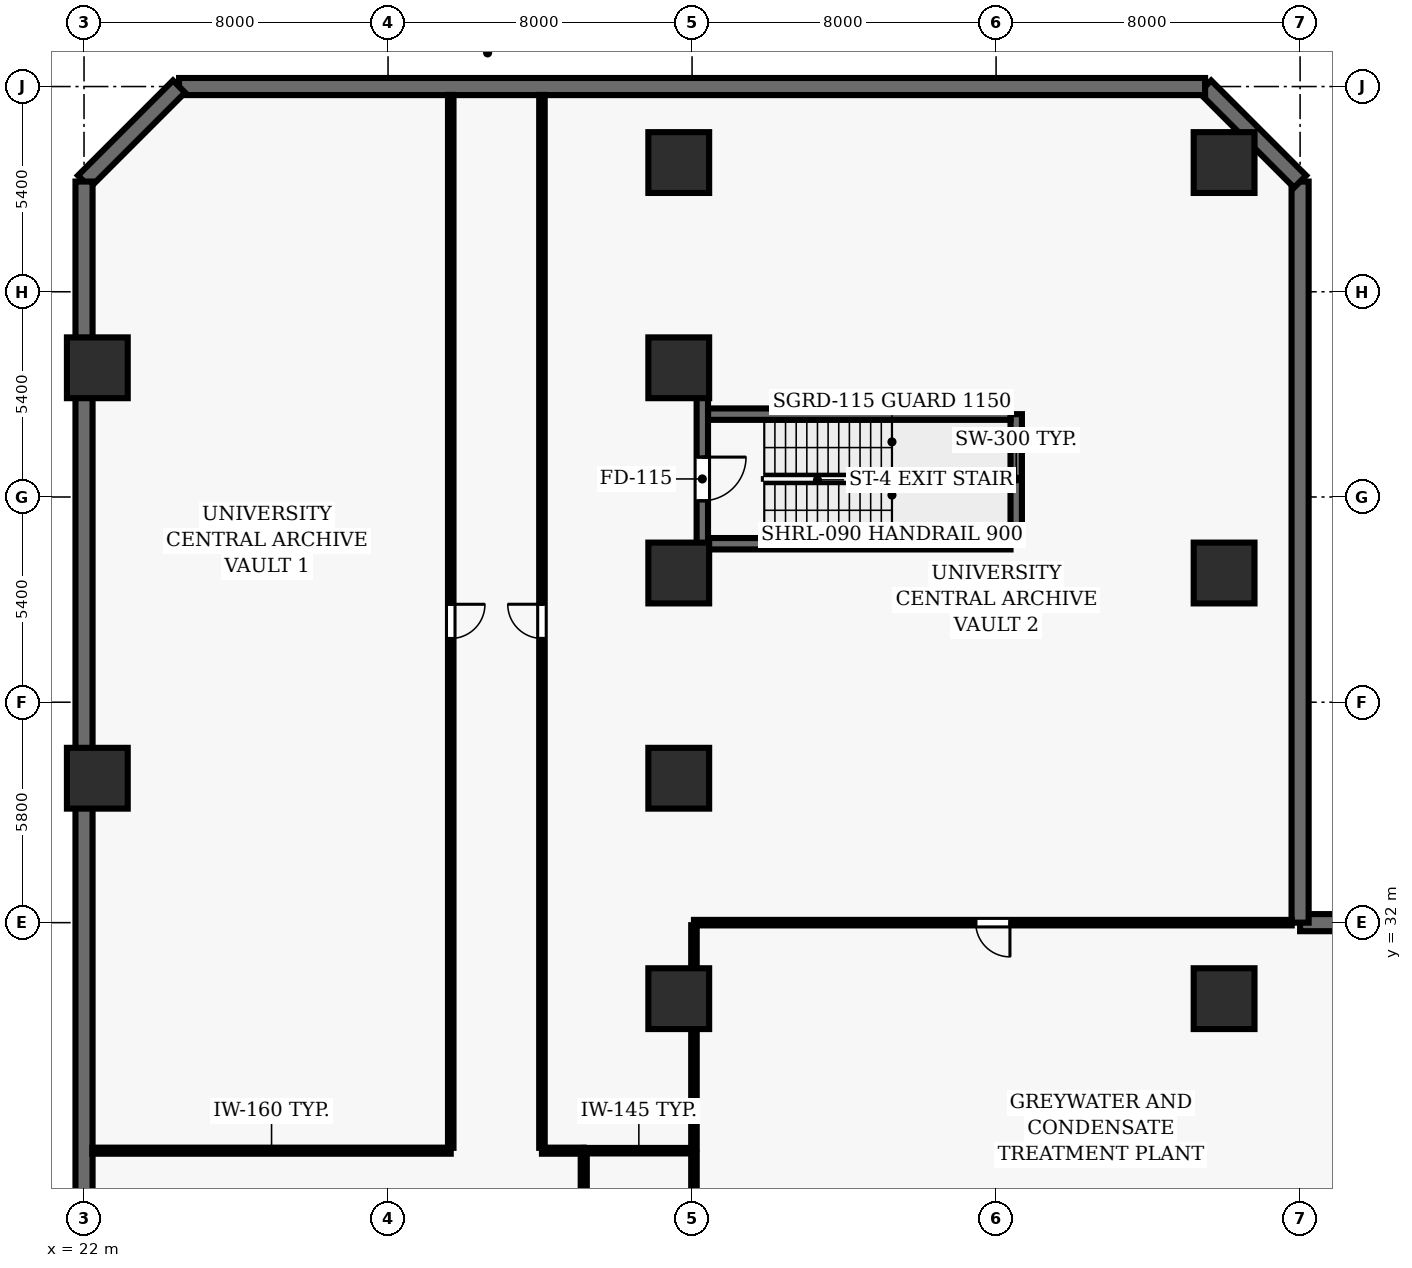
"""IFC4 building model, lengths in metres.
Left out: names, types, materials, properties, quantities, classifications, styles, units other than length and angle.
Written with IfcOpenShell. Run it as: python <this file> out.ifc"""

import sys

from ifc_helpers import new_model, si_unit, direction, frame, frame_2d, origin, origin_2d, place, context, subcontext, project, spatial, rectangle, extrude, element, fill, save


model = new_model("IFC4")
c1 = context("Model", 3, precision=1e-05, world=origin(), true_north=direction((0.0, 1.0)))
c2 = subcontext(c1, "Body", "Model", "MODEL_VIEW")
j1 = project(units=[si_unit("LENGTHUNIT", "METRE"), si_unit("PLANEANGLEUNIT", "RADIAN")], contexts=[c1])
p1 = place(None, origin())
s1 = spatial("IfcSite", under=j1, at=p1, CompositionType="ELEMENT")
p2 = place(p1, origin())
s2 = spatial("IfcBuilding", under=s1, at=p2, CompositionType="ELEMENT")
p3 = place(p2, frame((0.0, 0.0, -9.0)))
s3 = spatial("IfcBuildingStorey", under=s2, at=p3, CompositionType="ELEMENT", Elevation=-9.0)
for number, where, z_axis, x_axis in (
    (1, (37.65, 30.0, 0.0), (0.0, 0.0, 1.0), (1.0, 0.0, 0.0)),
    (2, (22.35, 35.8, 0.0), (0.0, 0.0, 1.0), (1.0, 0.0, 0.0)),
    (3, (37.65, 35.8, 0.0), (0.0, 0.0, 1.0), (1.0, 0.0, 0.0)),
    (4, (37.65, 41.2, 0.0), (0.0, 0.0, 1.0), (1.0, 0.0, 0.0)),
    (5, (22.35, 46.6, 0.0), (0.0, 0.0, 1.0), (1.0, 0.0, 0.0)),
    (6, (37.65, 46.6, 0.0), (0.0, 0.0, 1.0), (1.0, 0.0, 0.0)),
    (7, (37.65, 52.0, 0.0), (0.0, 0.0, 1.0), (1.0, 0.0, 0.0)),
    (8, (52.0, 30.0, 0.0), (0.0, 0.0, 1.0), (1.0, 0.0, 0.0)),
    (9, (52.0, 41.2, 0.0), (0.0, 0.0, 1.0), (1.0, 0.0, 0.0)),
    (10, (52.0, 52.0, 0.0), (0.0, 0.0, 1.0), (1.0, 0.0, 0.0)),
):
    element("IfcColumn", number, at=place(p3, frame(where, z_axis=z_axis, x_axis=x_axis)), inside=s3, PredefinedType="COLUMN", context=c2, shape_type="SweptSolid", body=[
        extrude(rectangle(XDim=1.6, YDim=1.6, at=origin_2d()), origin(), (0.0, 0.0, 1.0), 4.5),
    ])
for number, where, z_axis, x_axis in (
    (11, (73.5, 32.0, 0.0), (0.0, 0.0, 1.0), (-1.0, 0.0, 0.0)),
    (12, (54.0, 32.0, 0.0), (0.0, 0.0, 1.0), (0.0, 1.0, 0.0)),
):
    element("IfcWall", number, at=place(p3, frame(where, z_axis=z_axis, x_axis=x_axis)), inside=s3, PredefinedType="USERDEFINED", context=c2, shape_type="SweptSolid", body=[
        extrude(rectangle(XDim=19.5, YDim=0.45, at=frame_2d((9.75, 0.0))), origin(), (0.0, 0.0, 1.0), 4.22),
    ])
p4 = place(p3, frame((54.0, 51.5, 0.0), z_axis=(0.0, 0.0, 1.0), x_axis=(-0.707106781187, 0.707106781187, 0.0)))
e13 = element("IfcWall", 13, at=p4, inside=s3, PredefinedType="USERDEFINED", context=c2, shape_type="SweptSolid", body=[
    extrude(rectangle(XDim=3.536, YDim=0.45, at=frame_2d((1.768, 0.0))), origin(), (0.0, 0.0, 1.0), 4.22),
])
p5 = place(p3, frame((51.5, 54.0, 0.0), z_axis=(0.0, 0.0, 1.0), x_axis=(-1.0, 0.0, 0.0)))
e14 = element("IfcWall", 14, at=p5, inside=s3, PredefinedType="USERDEFINED", context=c2, shape_type="SweptSolid", body=[
    extrude(rectangle(XDim=27.0, YDim=0.45, at=frame_2d((13.5, 0.0))), origin(), (0.0, 0.0, 1.0), 4.22),
])
p6 = place(p3, frame((24.5, 54.0, 0.0), z_axis=(0.0, 0.0, 1.0), x_axis=(-0.707106781187, -0.707106781187, 0.0)))
e15 = element("IfcWall", 15, at=p6, inside=s3, PredefinedType="USERDEFINED", context=c2, shape_type="SweptSolid", body=[
    extrude(rectangle(XDim=3.536, YDim=0.45, at=frame_2d((1.768, 0.0))), origin(), (0.0, 0.0, 1.0), 4.22),
])
p7 = place(p3, frame((22.0, 51.5, 0.0), z_axis=(0.0, 0.0, 1.0), x_axis=(0.0, -1.0, 0.0)))
e16 = element("IfcWall", 16, at=p7, inside=s3, PredefinedType="USERDEFINED", context=c2, shape_type="SweptSolid", body=[
    extrude(rectangle(XDim=49.0, YDim=0.45, at=frame_2d((24.5, 0.0))), origin(), (0.0, 0.0, 1.0), 4.22),
])
p8 = place(p3, frame((38.42, 41.97, 0.0), z_axis=(0.0, 0.0, 1.0), x_axis=(1.0, 0.0, 0.0)))
e17 = element("IfcWall", 17, at=p8, inside=s3, PredefinedType="SHEAR", context=c2, shape_type="SweptSolid", body=[
    extrude(rectangle(XDim=7.96, YDim=0.3, at=frame_2d((3.98, 0.0))), origin(), (0.0, 0.0, 1.0), 4.22),
])
p9 = place(p3, frame((46.53, 41.97, 0.0), z_axis=(0.0, 0.0, 1.0), x_axis=(0.0, 1.0, 0.0)))
e18 = element("IfcWall", 18, at=p9, inside=s3, PredefinedType="SHEAR", context=c2, shape_type="SweptSolid", body=[
    extrude(rectangle(XDim=3.41, YDim=0.3, at=frame_2d((1.705, 0.0))), origin(), (0.0, 0.0, 1.0), 4.22),
])
p10 = place(p3, frame((46.38, 45.38, 0.0), z_axis=(0.0, 0.0, 1.0), x_axis=(-1.0, 0.0, 0.0)))
e19 = element("IfcWall", 19, at=p10, inside=s3, PredefinedType="SHEAR", context=c2, shape_type="SweptSolid", body=[
    extrude(rectangle(XDim=7.96, YDim=0.3, at=frame_2d((3.98, 0.0))), origin(), (0.0, 0.0, 1.0), 4.22),
])
p11 = place(p3, frame((38.27, 45.92, 0.0), z_axis=(0.0, 0.0, 1.0), x_axis=(0.0, -1.0, 0.0)))
e20 = element("IfcWall", 20, at=p11, inside=s3, PredefinedType="SHEAR", context=c2, shape_type="SweptSolid", body=[
    extrude(rectangle(XDim=3.95, YDim=0.3, at=frame_2d((1.975, 0.0))), origin(), (0.0, 0.0, 1.0), 4.22),
])
p12 = place(p11, frame((1.67, 0.0, 0.0)))
e21 = element("IfcOpeningElement", 21, at=p12, cuts=e20, PredefinedType="OPENING", context=c2, shape_type="SweptSolid", body=[
    extrude(rectangle(XDim=1.15, YDim=2.15, at=frame_2d((0.575, 1.075))), frame((0.0, 0.16, 0.0), z_axis=(0.0, -1.0, 0.0), x_axis=(1.0, 0.0, 0.0)), (0.0, 0.0, 1.0), 0.32),
])
p13 = place(p3, frame((31.65, 26.0, 0.0), z_axis=(0.0, 0.0, 1.0), x_axis=(-1.0, 0.0, 0.0)))
e22 = element("IfcWall", 22, at=p13, inside=s3, PredefinedType="PARTITIONING", context=c2, shape_type="SweptSolid", body=[
    extrude(rectangle(XDim=9.43, YDim=0.16, at=frame_2d((4.715, 0.0))), origin(), (0.0, 0.0, 1.0), 4.22),
])
p14 = place(p3, frame((35.15, 26.0, 0.0), z_axis=(0.0, 0.0, 1.0), x_axis=(-1.0, 0.0, 0.0)))
e23 = element("IfcWall", 23, at=p14, inside=s3, PredefinedType="PARTITIONING", context=c2, shape_type="SweptSolid", body=[
    extrude(rectangle(XDim=1.1, YDim=0.16, at=frame_2d((0.55, 0.0))), origin(), (0.0, 0.0, 1.0), 4.22),
])
p15 = place(p3, frame((35.15, 26.0, 0.0), z_axis=(0.0, 0.0, 1.0), x_axis=(1.0, 0.0, 0.0)))
e24 = element("IfcWall", 24, at=p15, inside=s3, PredefinedType="PARTITIONING", context=c2, shape_type="SweptSolid", body=[
    extrude(rectangle(XDim=2.9, YDim=0.145, at=frame_2d((1.45, 0.0))), origin(), (0.0, 0.0, 1.0), 4.22),
])
p16 = place(p3, frame((53.78, 32.0, 0.0), z_axis=(0.0, 0.0, 1.0), x_axis=(-1.0, 0.0, 0.0)))
e25 = element("IfcWall", 25, at=p16, inside=s3, PredefinedType="PARTITIONING", context=c2, shape_type="SweptSolid", body=[
    extrude(rectangle(XDim=15.73, YDim=0.145, at=frame_2d((7.865, 0.0))), origin(), (0.0, 0.0, 1.0), 4.22),
])
p17 = place(p16, frame((7.415, 0.0, 0.0)))
e26 = element("IfcOpeningElement", 26, at=p17, cuts=e25, PredefinedType="OPENING", context=c2, shape_type="SweptSolid", body=[
    extrude(rectangle(XDim=0.9, YDim=2.1, at=frame_2d((0.45, 1.05))), frame((0.0, 0.083, 0.0), z_axis=(0.0, -1.0, 0.0), x_axis=(1.0, 0.0, 0.0)), (0.0, 0.0, 1.0), 0.165),
])
p18 = place(p3, frame((31.65, 53.78, 0.0), z_axis=(0.0, 0.0, 1.0), x_axis=(0.0, -1.0, 0.0)))
e27 = element("IfcWall", 27, at=p18, inside=s3, PredefinedType="PARTITIONING", context=c2, shape_type="SweptSolid", body=[
    extrude(rectangle(XDim=27.705, YDim=0.145, at=frame_2d((13.853, 0.0))), origin(), (0.0, 0.0, 1.0), 4.22),
])
p19 = place(p18, frame((13.403, 0.0, 0.0)))
e28 = element("IfcOpeningElement", 28, at=p19, cuts=e27, PredefinedType="OPENING", context=c2, shape_type="SweptSolid", body=[
    extrude(rectangle(XDim=0.9, YDim=2.1, at=frame_2d((0.45, 1.05))), frame((0.0, 0.083, 0.0), z_axis=(0.0, -1.0, 0.0), x_axis=(1.0, 0.0, 0.0)), (0.0, 0.0, 1.0), 0.165),
])
p20 = place(p3, frame((34.05, 26.075, 0.0), z_axis=(0.0, 0.0, 1.0), x_axis=(0.0, 1.0, 0.0)))
e29 = element("IfcWall", 29, at=p20, inside=s3, PredefinedType="PARTITIONING", context=c2, shape_type="SweptSolid", body=[
    extrude(rectangle(XDim=27.705, YDim=0.145, at=frame_2d((13.853, 0.0))), origin(), (0.0, 0.0, 1.0), 4.22),
])
p21 = place(p20, frame((13.403, 0.0, 0.0)))
e30 = element("IfcOpeningElement", 30, at=p21, cuts=e29, PredefinedType="OPENING", context=c2, shape_type="SweptSolid", body=[
    extrude(rectangle(XDim=0.9, YDim=2.1, at=frame_2d((0.45, 1.05))), frame((0.0, 0.083, 0.0), z_axis=(0.0, -1.0, 0.0), x_axis=(1.0, 0.0, 0.0)), (0.0, 0.0, 1.0), 0.165),
])
p22 = place(p3, frame((35.15, 23.85, 0.0), z_axis=(0.0, 0.0, 1.0), x_axis=(0.0, 1.0, 0.0)))
e31 = element("IfcWall", 31, at=p22, inside=s3, PredefinedType="PARTITIONING", context=c2, shape_type="SweptSolid", body=[
    extrude(rectangle(XDim=2.075, YDim=0.16, at=frame_2d((1.038, 0.0))), origin(), (0.0, 0.0, 1.0), 4.22),
])
p23 = place(p3, frame((38.05, 25.933, 0.0), z_axis=(0.0, 0.0, 1.0), x_axis=(0.0, -1.0, 0.0)))
e32 = element("IfcWall", 32, at=p23, inside=s3, PredefinedType="PARTITIONING", context=c2, shape_type="SweptSolid", body=[
    extrude(rectangle(XDim=4.866, YDim=0.145, at=frame_2d((2.433, 0.0))), origin(), (0.0, 0.0, 1.0), 3.365),
])
p24 = place(p3, frame((38.05, 31.933, 0.0), z_axis=(0.0, 0.0, 1.0), x_axis=(0.0, -1.0, 0.0)))
e33 = element("IfcWall", 33, at=p24, inside=s3, PredefinedType="PARTITIONING", context=c2, shape_type="SweptSolid", body=[
    extrude(rectangle(XDim=5.866, YDim=0.145, at=frame_2d((2.933, 0.0))), origin(), (0.0, 0.0, 1.0), 3.365),
])
p25 = place(p12, origin())
e34 = element("IfcDoor", 34, at=p25, inside=s3, OperationType="SINGLE_SWING_LEFT", PredefinedType="DOOR", context=c2, shape_type="SweptSolid", body=[
    extrude(rectangle(XDim=1.15, YDim=2.15, at=frame_2d((0.575, 1.075))), frame((0.0, 0.025, 0.0), z_axis=(0.0, -1.0, 0.0), x_axis=(1.0, 0.0, 0.0)), (0.0, 0.0, 1.0), 0.05),
])
fill(e21, e34)
p26 = place(p19, origin())
e35 = element("IfcDoor", 35, at=p26, inside=s3, OperationType="SINGLE_SWING_LEFT", PredefinedType="DOOR", context=c2, shape_type="SweptSolid", body=[
    extrude(rectangle(XDim=0.9, YDim=2.1, at=frame_2d((0.45, 1.05))), frame((0.0, 0.025, 0.0), z_axis=(0.0, -1.0, 0.0), x_axis=(1.0, 0.0, 0.0)), (0.0, 0.0, 1.0), 0.05),
])
fill(e28, e35)
p27 = place(p21, origin())
e36 = element("IfcDoor", 36, at=p27, inside=s3, OperationType="SINGLE_SWING_RIGHT", PredefinedType="DOOR", context=c2, shape_type="SweptSolid", body=[
    extrude(rectangle(XDim=0.9, YDim=2.1, at=frame_2d((0.45, 1.05))), frame((0.0, 0.025, 0.0), z_axis=(0.0, -1.0, 0.0), x_axis=(1.0, 0.0, 0.0)), (0.0, 0.0, 1.0), 0.05),
])
fill(e30, e36)
p28 = place(p17, origin())
e37 = element("IfcDoor", 37, at=p28, inside=s3, OperationType="SINGLE_SWING_LEFT", PredefinedType="DOOR", context=c2, shape_type="SweptSolid", body=[
    extrude(rectangle(XDim=0.9, YDim=2.1, at=frame_2d((0.45, 1.05))), frame((0.0, 0.025, 0.0), z_axis=(0.0, -1.0, 0.0), x_axis=(1.0, 0.0, 0.0)), (0.0, 0.0, 1.0), 0.05),
])
fill(e26, e37)
save(model, sys.argv[1])
